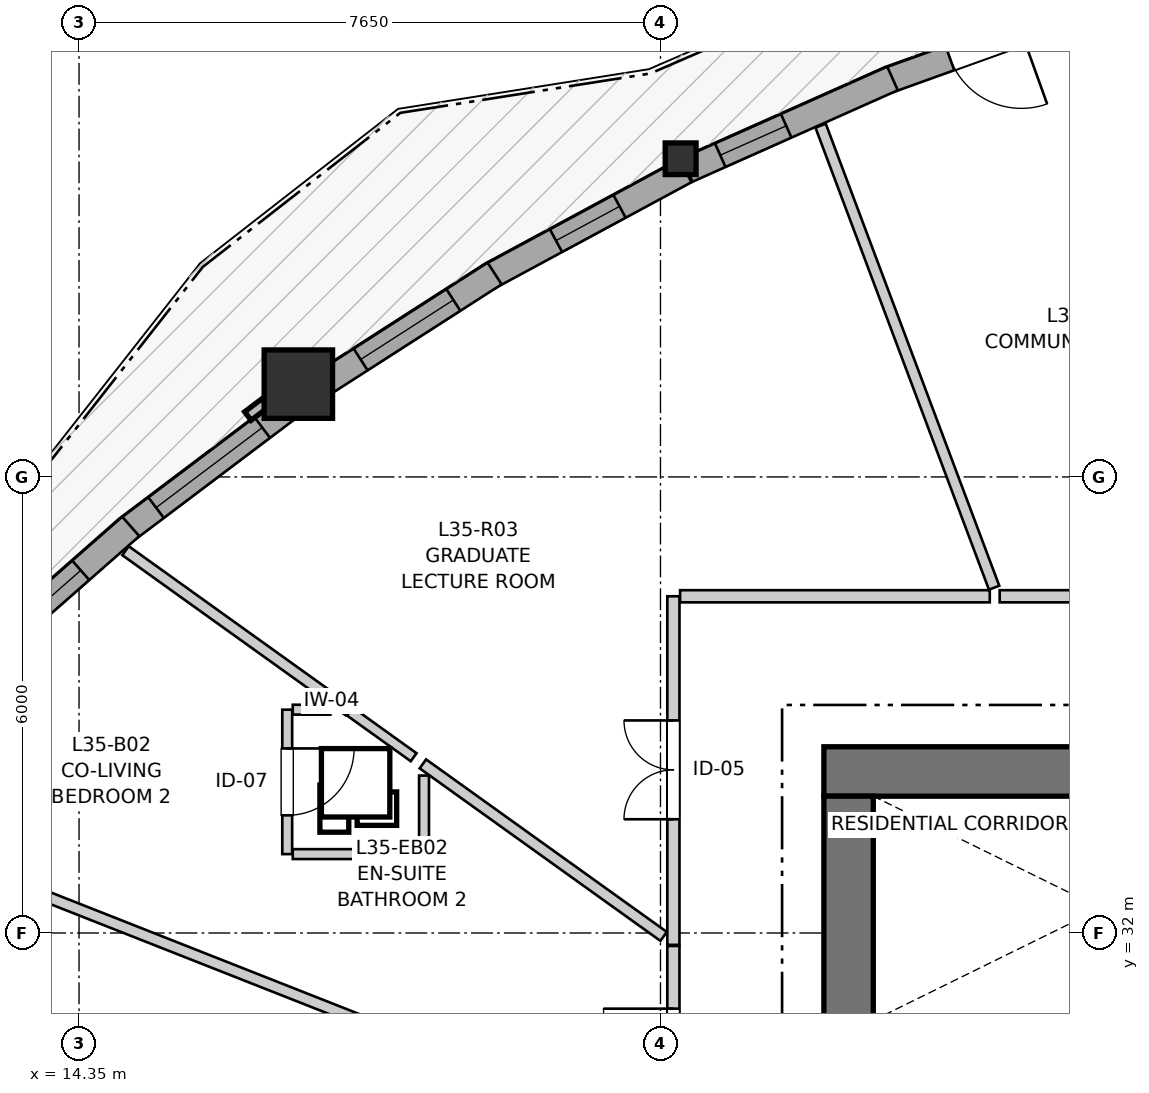
"""IFC4 building model, lengths in metres.
Left out: names, types, materials, properties, quantities, classifications, styles, units other than length and angle.
Written with IfcOpenShell. Run it as: python <this file> out.ifc"""

import sys

from ifc_helpers import new_model, si_unit, direction, frame, frame_2d, origin, origin_2d, place, context, subcontext, project, spatial, rectangle, i_section, extrude, source, transform, mapped, element, fill, save


model = new_model("IFC4")
c1 = context("Model", 3, precision=1e-05, world=origin(), true_north=direction((0.0, 1.0)))
c2 = subcontext(c1, "Body", "Model", "MODEL_VIEW")
j1 = project(units=[si_unit("LENGTHUNIT", "METRE"), si_unit("PLANEANGLEUNIT", "RADIAN")], contexts=[c1])
p1 = place(None, origin())
s1 = spatial("IfcSite", under=j1, at=p1, CompositionType="ELEMENT")
p2 = place(p1, origin())
s2 = spatial("IfcBuilding", under=s1, at=p2, CompositionType="ELEMENT")
p3 = place(p2, frame((0.0, 0.0, 118.4)))
s3 = spatial("IfcBuildingStorey", under=s2, at=p3, CompositionType="ELEMENT", Elevation=118.4)
p4 = place(p3, frame((36.55, 34.125, 0.0), z_axis=(0.0, 0.0, 1.0), x_axis=(-1.0, 0.0, 0.0)))
e1 = element("IfcWall", 1, at=p4, inside=s3, PredefinedType="SHEAR", context=c2, shape_type="SweptSolid", body=[
    extrude(rectangle(XDim=12.4, YDim=0.65, at=frame_2d((6.2, 0.0))), origin(), (0.0, 0.0, 1.0), 2.95),
])
p5 = place(p3, frame((24.475, 33.8, 0.0), z_axis=(0.0, 0.0, 1.0), x_axis=(0.0, -1.0, 0.0)))
e2 = element("IfcWall", 2, at=p5, inside=s3, PredefinedType="SHEAR", context=c2, shape_type="SweptSolid", body=[
    extrude(rectangle(XDim=15.6, YDim=0.65, at=frame_2d((7.8, 0.0))), origin(), (0.0, 0.0, 1.0), 2.95),
])
p6 = place(p5, frame((7.05, 0.0, 0.0)))
e3 = element("IfcOpeningElement", 3, at=p6, cuts=e2, PredefinedType="OPENING", context=c2, shape_type="SweptSolid", body=[
    extrude(rectangle(XDim=1.5, YDim=2.15, at=frame_2d((0.75, 1.075))), frame((0.0, 0.335, 0.0), z_axis=(0.0, -1.0, 0.0), x_axis=(1.0, 0.0, 0.0)), (0.0, 0.0, 1.0), 0.67),
])
p7 = place(p5, frame((3.52, 0.0, 0.0)))
e4 = element("IfcOpeningElement", 4, at=p7, cuts=e2, PredefinedType="OPENING", context=c2, shape_type="SweptSolid", body=[
    extrude(rectangle(XDim=0.86, YDim=2.05, at=frame_2d((0.43, 1.025))), frame((0.0, 0.335, 0.0), z_axis=(0.0, -1.0, 0.0), x_axis=(1.0, 0.0, 0.0)), (0.0, 0.0, 1.0), 0.67),
])
p8 = place(p5, frame((11.22, 0.0, 0.0)))
e5 = element("IfcOpeningElement", 5, at=p8, cuts=e2, PredefinedType="OPENING", context=c2, shape_type="SweptSolid", body=[
    extrude(rectangle(XDim=0.86, YDim=2.05, at=frame_2d((0.43, 1.025))), frame((0.0, 0.335, 0.0), z_axis=(0.0, -1.0, 0.0), x_axis=(1.0, 0.0, 0.0)), (0.0, 0.0, 1.0), 0.67),
])
m1 = source(origin(), c2, "Body", "SweptSolid", [
    extrude(i_section(OverallWidth=0.406, OverallDepth=0.416, WebThickness=0.027, FlangeThickness=0.044, FilletRadius=0.015, at=origin_2d()), origin(), (0.0, 0.0, 1.0), 2.95),
])
p9 = place(p3, frame((22.265, 42.186, 0.0), z_axis=(0.0, 0.0, 1.0), x_axis=(1.0, 0.0, 0.0)))
e6 = element("IfcColumn", 6, at=p9, inside=s3, PredefinedType="PILASTER", context=c2, shape_type="MappedRepresentation", body=[
    mapped(m1, transform((0.0, 0.0, 0.0), x_axis=(1.0, 0.0, 0.0), y_axis=(0.0, 1.0, 0.0), z_axis=(0.0, 0.0, 1.0), scale=1.0)),
])
m2 = source(origin(), c2, "Body", "SweptSolid", [
    extrude(rectangle(XDim=0.9, YDim=0.9, at=origin_2d()), origin(), (0.0, 0.0, 1.0), 2.95),
])
p10 = place(p3, frame((17.236, 39.221, 0.0), z_axis=(0.0, 0.0, 1.0), x_axis=(1.0, 0.0, 0.0)))
e7 = element("IfcColumn", 7, at=p10, inside=s3, PredefinedType="COLUMN", context=c2, shape_type="MappedRepresentation", body=[
    mapped(m2, transform((0.0, 0.0, 0.0), x_axis=(1.0, 0.0, 0.0), y_axis=(0.0, 1.0, 0.0), z_axis=(0.0, 0.0, 1.0), scale=1.0)),
])
p11 = place(p3, frame((27.586, 44.149, 0.0), z_axis=(0.0, 0.0, 1.0), x_axis=(-0.941112277287, -0.338094190338, 0.0)))
e8 = element("IfcWall", 8, at=p11, inside=s3, PredefinedType="SOLIDWALL", context=c2, shape_type="SweptSolid", body=[
    extrude(rectangle(XDim=2.779, YDim=0.34, at=frame_2d((1.39, 0.0))), origin(), (0.0, 0.0, 1.0), 2.48),
])
p12 = place(p11, frame((0.89, 0.0, 0.0)))
e9 = element("IfcOpeningElement", 9, at=p12, cuts=e8, PredefinedType="OPENING", context=c2, shape_type="SweptSolid", body=[
    extrude(rectangle(XDim=1.0, YDim=2.1, at=frame_2d((0.5, 1.05))), frame((0.0, 0.18, 0.0), z_axis=(0.0, -1.0, 0.0), x_axis=(1.0, 0.0, 0.0)), (0.0, 0.0, 1.0), 0.36),
])
p13 = place(p3, frame((25.053, 43.243, 0.0), z_axis=(0.0, 0.0, 1.0), x_axis=(-0.91339900063, -0.407065431655, 0.0)))
e10 = element("IfcWall", 10, at=p13, inside=s3, PredefinedType="SOLIDWALL", context=c2, shape_type="SweptSolid", body=[
    extrude(rectangle(XDim=2.956, YDim=0.34, at=frame_2d((1.478, 0.0))), origin(), (0.0, 0.0, 1.0), 2.48),
])
p14 = place(p13, frame((1.531, 0.0, 0.82)))
e11 = element("IfcOpeningElement", 11, at=p14, cuts=e10, PredefinedType="OPENING", context=c2, shape_type="SweptSolid", body=[
    extrude(rectangle(XDim=0.95, YDim=1.35, at=frame_2d((0.475, 0.675))), frame((0.0, 0.18, 0.0), z_axis=(0.0, -1.0, 0.0), x_axis=(1.0, 0.0, 0.0)), (0.0, 0.0, 1.0), 0.36),
])
p15 = place(p3, frame((22.328, 42.027, 0.0), z_axis=(0.0, 0.0, 1.0), x_axis=(-0.880092136679, -0.474802939077, 0.0)))
e12 = element("IfcWall", 12, at=p15, inside=s3, PredefinedType="SOLIDWALL", context=c2, shape_type="SweptSolid", body=[
    extrude(rectangle(XDim=2.94, YDim=0.34, at=frame_2d((1.47, 0.0))), origin(), (0.0, 0.0, 1.0), 2.48),
])
p16 = place(p15, frame((0.985, 0.0, 0.82)))
e13 = element("IfcOpeningElement", 13, at=p16, cuts=e12, PredefinedType="OPENING", context=c2, shape_type="SweptSolid", body=[
    extrude(rectangle(XDim=0.95, YDim=1.35, at=frame_2d((0.475, 0.675))), frame((0.0, 0.18, 0.0), z_axis=(0.0, -1.0, 0.0), x_axis=(1.0, 0.0, 0.0)), (0.0, 0.0, 1.0), 0.36),
])
p17 = place(p3, frame((19.818, 40.677, 0.0), z_axis=(0.0, 0.0, 1.0), x_axis=(-0.841503814414, -0.540251173369, 0.0)))
e14 = element("IfcWall", 14, at=p17, inside=s3, PredefinedType="SOLIDWALL", context=c2, shape_type="SweptSolid", body=[
    extrude(rectangle(XDim=2.729, YDim=0.34, at=frame_2d((1.365, 0.0))), origin(), (0.0, 0.0, 1.0), 2.48),
])
p18 = place(p17, frame((0.645, 0.0, 0.82)))
e15 = element("IfcOpeningElement", 15, at=p18, cuts=e14, PredefinedType="OPENING", context=c2, shape_type="SweptSolid", body=[
    extrude(rectangle(XDim=1.45, YDim=1.25, at=frame_2d((0.725, 0.625))), frame((0.0, 0.18, 0.0), z_axis=(0.0, -1.0, 0.0), x_axis=(1.0, 0.0, 0.0)), (0.0, 0.0, 1.0), 0.36),
])
p19 = place(p3, frame((17.154, 38.947, 0.0), z_axis=(0.0, 0.0, 1.0), x_axis=(-0.798332692302, -0.602216665663, 0.0)))
e16 = element("IfcWall", 16, at=p19, inside=s3, PredefinedType="SOLIDWALL", context=c2, shape_type="SweptSolid", body=[
    extrude(rectangle(XDim=2.746, YDim=0.34, at=frame_2d((1.373, 0.0))), origin(), (0.0, 0.0, 1.0), 2.48),
])
p20 = place(p19, frame((0.493, 0.0, 0.82)))
e17 = element("IfcOpeningElement", 17, at=p20, cuts=e16, PredefinedType="OPENING", context=c2, shape_type="SweptSolid", body=[
    extrude(rectangle(XDim=1.75, YDim=1.3, at=frame_2d((0.875, 0.65))), frame((0.0, 0.18, 0.0), z_axis=(0.0, -1.0, 0.0), x_axis=(1.0, 0.0, 0.0)), (0.0, 0.0, 1.0), 0.36),
])
p21 = place(p3, frame((15.031, 37.349, 0.0), z_axis=(0.0, 0.0, 1.0), x_axis=(-0.751472812955, -0.659764057364, 0.0)))
e18 = element("IfcWall", 18, at=p21, inside=s3, PredefinedType="SOLIDWALL", context=c2, shape_type="SweptSolid", body=[
    extrude(rectangle(XDim=2.99, YDim=0.34, at=frame_2d((1.495, 0.0))), origin(), (0.0, 0.0, 1.0), 2.48),
])
p22 = place(p21, frame((0.875, 0.0, 0.82)))
e19 = element("IfcOpeningElement", 19, at=p22, cuts=e18, PredefinedType="OPENING", context=c2, shape_type="SweptSolid", body=[
    extrude(rectangle(XDim=1.45, YDim=1.25, at=frame_2d((0.725, 0.625))), frame((0.0, 0.18, 0.0), z_axis=(0.0, -1.0, 0.0), x_axis=(1.0, 0.0, 0.0)), (0.0, 0.0, 1.0), 0.36),
])
p23 = place(p3, frame((22.17, 31.844, 0.0), z_axis=(0.0, 0.0, 1.0), x_axis=(0.0, 1.0, 0.0)))
e20 = element("IfcWall", 20, at=p23, inside=s3, PredefinedType="PARTITIONING", context=c2, shape_type="SweptSolid", body=[
    extrude(rectangle(XDim=4.586, YDim=0.16, at=frame_2d((2.293, 0.0))), origin(), (0.0, 0.0, 1.0), 2.95),
])
p24 = place(p23, frame((1.653, 0.0, 0.0)))
e21 = element("IfcOpeningElement", 21, at=p24, cuts=e20, PredefinedType="OPENING", context=c2, shape_type="SweptSolid", body=[
    extrude(rectangle(XDim=1.3, YDim=2.1, at=frame_2d((0.65, 1.05))), frame((0.0, 0.09, 0.0), z_axis=(0.0, -1.0, 0.0), x_axis=(1.0, 0.0, 0.0)), (0.0, 0.0, 1.0), 0.18),
])
p25 = place(p3, frame((26.463, 36.43, 0.0), z_axis=(0.0, 0.0, 1.0), x_axis=(1.0, 0.0, 0.0)))
e22 = element("IfcWall", 22, at=p25, inside=s3, PredefinedType="PARTITIONING", context=c2, shape_type="SweptSolid", body=[
    extrude(rectangle(XDim=3.585, YDim=0.16, at=frame_2d((1.792, 0.0))), origin(), (0.0, 0.0, 1.0), 2.95),
])
p26 = place(p25, frame((1.119, 0.0, 0.0)))
e23 = element("IfcOpeningElement", 23, at=p26, cuts=e22, PredefinedType="OPENING", context=c2, shape_type="SweptSolid", body=[
    extrude(rectangle(XDim=1.3, YDim=2.1, at=frame_2d((0.65, 1.05))), frame((0.0, 0.09, 0.0), z_axis=(0.0, -1.0, 0.0), x_axis=(1.0, 0.0, 0.0)), (0.0, 0.0, 1.0), 0.18),
])
p27 = place(p3, frame((22.17, 29.209, 0.0), z_axis=(0.0, 0.0, 1.0), x_axis=(0.0, 1.0, 0.0)))
e24 = element("IfcWall", 24, at=p27, inside=s3, PredefinedType="PARTITIONING", context=c2, shape_type="SweptSolid", body=[
    extrude(rectangle(XDim=2.62, YDim=0.16, at=frame_2d((1.31, 0.0))), origin(), (0.0, 0.0, 1.0), 2.95),
])
p28 = place(p27, frame((0.875, 0.0, 0.0)))
e25 = element("IfcOpeningElement", 25, at=p28, cuts=e24, PredefinedType="OPENING", context=c2, shape_type="SweptSolid", body=[
    extrude(rectangle(XDim=0.92, YDim=2.1, at=frame_2d((0.46, 1.05))), frame((0.0, 0.09, 0.0), z_axis=(0.0, -1.0, 0.0), x_axis=(1.0, 0.0, 0.0)), (0.0, 0.0, 1.0), 0.18),
])
p29 = place(p3, frame((17.089, 34.938, 0.0), z_axis=(0.0, 0.0, 1.0), x_axis=(0.0, -1.0, 0.0)))
e26 = element("IfcWall", 26, at=p29, inside=s3, PredefinedType="PARTITIONING", context=c2, shape_type="SweptSolid", body=[
    extrude(rectangle(XDim=1.9, YDim=0.13, at=frame_2d((0.95, 0.0))), origin(), (0.0, 0.0, 1.0), 2.95),
])
p30 = place(p29, frame((0.51, 0.0, 0.0)))
e27 = element("IfcOpeningElement", 27, at=p30, cuts=e26, PredefinedType="OPENING", context=c2, shape_type="SweptSolid", body=[
    extrude(rectangle(XDim=0.88, YDim=2.05, at=frame_2d((0.44, 1.025))), frame((0.0, 0.075, 0.0), z_axis=(0.0, -1.0, 0.0), x_axis=(1.0, 0.0, 0.0)), (0.0, 0.0, 1.0), 0.15),
])
p31 = place(p3, frame((11.228, 33.54, 0.0), z_axis=(0.0, 0.0, 1.0), x_axis=(0.930301058265, -0.366796866114, 0.0)))
e28 = element("IfcWall", 28, at=p31, inside=s3, PredefinedType="PARTITIONING", context=c2, shape_type="SweptSolid", body=[
    extrude(rectangle(XDim=11.639, YDim=0.145, at=frame_2d((5.82, 0.0))), origin(), (0.0, 0.0, 1.0), 2.95),
])
p32 = place(p3, frame((24.107, 42.621, 0.0), z_axis=(0.0, 0.0, 1.0), x_axis=(0.351605509999, -0.93614826034, 0.0)))
e29 = element("IfcWall", 29, at=p32, inside=s3, PredefinedType="PARTITIONING", context=c2, shape_type="SweptSolid", body=[
    extrude(rectangle(XDim=6.493, YDim=0.145, at=frame_2d((3.247, 0.0))), origin(), (0.0, 0.0, 1.0), 2.95),
])
p33 = place(p3, frame((22.258, 36.43, 0.0), z_axis=(0.0, 0.0, 1.0), x_axis=(1.0, 0.0, 0.0)))
e30 = element("IfcWall", 30, at=p33, inside=s3, PredefinedType="PARTITIONING", context=c2, shape_type="SweptSolid", body=[
    extrude(rectangle(XDim=4.074, YDim=0.16, at=frame_2d((2.037, 0.0))), origin(), (0.0, 0.0, 1.0), 2.588),
])
p34 = place(p3, frame((18.874, 34.225, 0.0), z_axis=(0.0, 0.0, 1.0), x_axis=(0.812826521731, -0.582505833079, 0.0)))
e31 = element("IfcWall", 31, at=p34, inside=s3, PredefinedType="PARTITIONING", context=c2, shape_type="SweptSolid", body=[
    extrude(rectangle(XDim=3.896, YDim=0.145, at=frame_2d((1.948, 0.0))), origin(), (0.0, 0.0, 1.0), 2.95),
])
p35 = place(p3, frame((14.961, 37.03, 0.0), z_axis=(0.0, 0.0, 1.0), x_axis=(0.812838437321, -0.582489205748, 0.0)))
e32 = element("IfcWall", 32, at=p35, inside=s3, PredefinedType="PARTITIONING", context=c2, shape_type="SweptSolid", body=[
    extrude(rectangle(XDim=3.616, YDim=0.145, at=frame_2d((1.808, 0.0))), origin(), (0.0, 0.0, 1.0), 2.95),
])
p36 = place(p3, frame((17.162, 33.038, 0.0), z_axis=(0.0, 0.0, 1.0), x_axis=(1.0, 0.0, 0.0)))
e33 = element("IfcWall", 33, at=p36, inside=s3, PredefinedType="PARTITIONING", context=c2, shape_type="SweptSolid", body=[
    extrude(rectangle(XDim=1.727, YDim=0.13, at=frame_2d((0.863, 0.0))), origin(), (0.0, 0.0, 1.0), 2.95),
])
p37 = place(p3, frame((18.889, 33.111, 0.0), z_axis=(0.0, 0.0, 1.0), x_axis=(0.0, 1.0, 0.0)))
e34 = element("IfcWall", 34, at=p37, inside=s3, PredefinedType="PARTITIONING", context=c2, shape_type="SweptSolid", body=[
    extrude(rectangle(XDim=0.96, YDim=0.13, at=frame_2d((0.48, 0.0))), origin(), (0.0, 0.0, 1.0), 2.95),
])
p38 = place(p3, frame((17.913, 34.914, 0.0), z_axis=(0.0, 0.0, 1.0), x_axis=(0.812774229327, -0.582578794792, 0.0)))
e35 = element("IfcWall", 35, at=p38, inside=s3, PredefinedType="PARTITIONING", context=c2, shape_type="SweptSolid", body=[
    extrude(rectangle(XDim=1.033, YDim=0.13, at=frame_2d((0.517, 0.0))), origin(), (0.0, 0.0, 1.0), 2.95),
])
p39 = place(p3, frame((17.162, 34.938, 0.0), z_axis=(0.0, 0.0, 1.0), x_axis=(1.0, 0.0, 0.0)))
e36 = element("IfcWall", 36, at=p39, inside=s3, PredefinedType="PARTITIONING", context=c2, shape_type="SweptSolid", body=[
    extrude(rectangle(XDim=0.495, YDim=0.13, at=frame_2d((0.247, 0.0))), origin(), (0.0, 0.0, 1.0), 2.95),
])
m3 = source(origin(), c2, "Body", "SweptSolid", [
    extrude(rectangle(XDim=0.95, YDim=1.35, at=frame_2d((0.475, 0.675))), frame((0.0, 0.03, 0.0), z_axis=(0.0, -1.0, 0.0), x_axis=(1.0, 0.0, 0.0)), (0.0, 0.0, 1.0), 0.06),
])
p40 = place(p14, origin())
e37 = element("IfcWindow", 37, at=p40, inside=s3, PartitioningType="SINGLE_PANEL", PredefinedType="WINDOW", context=c2, shape_type="MappedRepresentation", body=[
    mapped(m3, transform((0.0, 0.0, 0.0), x_axis=(1.0, 0.0, 0.0), y_axis=(0.0, 1.0, 0.0), z_axis=(0.0, 0.0, 1.0), scale=1.0)),
])
fill(e11, e37)
p41 = place(p16, origin())
e38 = element("IfcWindow", 38, at=p41, inside=s3, PartitioningType="SINGLE_PANEL", PredefinedType="WINDOW", context=c2, shape_type="MappedRepresentation", body=[
    mapped(m3, transform((0.0, 0.0, 0.0), x_axis=(1.0, 0.0, 0.0), y_axis=(0.0, 1.0, 0.0), z_axis=(0.0, 0.0, 1.0), scale=1.0)),
])
fill(e13, e38)
m4 = source(origin(), c2, "Body", "SweptSolid", [
    extrude(rectangle(XDim=1.45, YDim=1.25, at=frame_2d((0.725, 0.625))), frame((0.0, 0.03, 0.0), z_axis=(0.0, -1.0, 0.0), x_axis=(1.0, 0.0, 0.0)), (0.0, 0.0, 1.0), 0.06),
])
p42 = place(p18, origin())
e39 = element("IfcWindow", 39, at=p42, inside=s3, PartitioningType="SINGLE_PANEL", PredefinedType="WINDOW", context=c2, shape_type="MappedRepresentation", body=[
    mapped(m4, transform((0.0, 0.0, 0.0), x_axis=(1.0, 0.0, 0.0), y_axis=(0.0, 1.0, 0.0), z_axis=(0.0, 0.0, 1.0), scale=1.0)),
])
fill(e15, e39)
m5 = source(origin(), c2, "Body", "SweptSolid", [
    extrude(rectangle(XDim=1.75, YDim=1.3, at=frame_2d((0.875, 0.65))), frame((0.0, 0.03, 0.0), z_axis=(0.0, -1.0, 0.0), x_axis=(1.0, 0.0, 0.0)), (0.0, 0.0, 1.0), 0.06),
])
p43 = place(p20, origin())
e40 = element("IfcWindow", 40, at=p43, inside=s3, PartitioningType="SINGLE_PANEL", PredefinedType="WINDOW", context=c2, shape_type="MappedRepresentation", body=[
    mapped(m5, transform((0.0, 0.0, 0.0), x_axis=(1.0, 0.0, 0.0), y_axis=(0.0, 1.0, 0.0), z_axis=(0.0, 0.0, 1.0), scale=1.0)),
])
fill(e17, e40)
p44 = place(p22, origin())
e41 = element("IfcWindow", 41, at=p44, inside=s3, PartitioningType="SINGLE_PANEL", PredefinedType="WINDOW", context=c2, shape_type="MappedRepresentation", body=[
    mapped(m4, transform((0.0, 0.0, 0.0), x_axis=(1.0, 0.0, 0.0), y_axis=(0.0, 1.0, 0.0), z_axis=(0.0, 0.0, 1.0), scale=1.0)),
])
fill(e19, e41)
m6 = source(origin(), c2, "Body", "SweptSolid", [
    extrude(rectangle(XDim=1.0, YDim=2.1, at=frame_2d((0.5, 1.05))), frame((0.0, 0.025, 0.0), z_axis=(0.0, -1.0, 0.0), x_axis=(1.0, 0.0, 0.0)), (0.0, 0.0, 1.0), 0.05),
])
p45 = place(p12, origin())
e42 = element("IfcDoor", 42, at=p45, inside=s3, OperationType="SINGLE_SWING_LEFT", PredefinedType="DOOR", context=c2, shape_type="MappedRepresentation", body=[
    mapped(m6, transform((0.0, 0.0, 0.0), x_axis=(1.0, 0.0, 0.0), y_axis=(0.0, 1.0, 0.0), z_axis=(0.0, 0.0, 1.0), scale=1.0)),
])
fill(e9, e42)
m7 = source(origin(), c2, "Body", "SweptSolid", [
    extrude(rectangle(XDim=1.3, YDim=2.1, at=frame_2d((0.65, 1.05))), frame((0.0, 0.025, 0.0), z_axis=(0.0, -1.0, 0.0), x_axis=(1.0, 0.0, 0.0)), (0.0, 0.0, 1.0), 0.05),
])
p46 = place(p24, origin())
e43 = element("IfcDoor", 43, at=p46, inside=s3, OperationType="DOUBLE_DOOR_SINGLE_SWING", PredefinedType="DOOR", context=c2, shape_type="MappedRepresentation", body=[
    mapped(m7, transform((0.0, 0.0, 0.0), x_axis=(1.0, 0.0, 0.0), y_axis=(0.0, 1.0, 0.0), z_axis=(0.0, 0.0, 1.0), scale=1.0)),
])
fill(e21, e43)
m8 = source(origin(), c2, "Body", "SweptSolid", [
    extrude(rectangle(XDim=0.92, YDim=2.1, at=frame_2d((0.46, 1.05))), frame((0.0, 0.025, 0.0), z_axis=(0.0, -1.0, 0.0), x_axis=(1.0, 0.0, 0.0)), (0.0, 0.0, 1.0), 0.05),
])
p47 = place(p28, origin())
e44 = element("IfcDoor", 44, at=p47, inside=s3, OperationType="SINGLE_SWING_RIGHT", PredefinedType="DOOR", context=c2, shape_type="MappedRepresentation", body=[
    mapped(m8, transform((0.0, 0.0, 0.0), x_axis=(1.0, 0.0, 0.0), y_axis=(0.0, 1.0, 0.0), z_axis=(0.0, 0.0, 1.0), scale=1.0)),
])
fill(e25, e44)
m9 = source(origin(), c2, "Body", "SweptSolid", [
    extrude(rectangle(XDim=0.88, YDim=2.05, at=frame_2d((0.44, 1.025))), frame((0.0, 0.025, 0.0), z_axis=(0.0, -1.0, 0.0), x_axis=(1.0, 0.0, 0.0)), (0.0, 0.0, 1.0), 0.05),
])
p48 = place(p30, origin())
e45 = element("IfcDoor", 45, at=p48, inside=s3, OperationType="SINGLE_SWING_LEFT", PredefinedType="DOOR", context=c2, shape_type="MappedRepresentation", body=[
    mapped(m9, transform((0.0, 0.0, 0.0), x_axis=(1.0, 0.0, 0.0), y_axis=(0.0, 1.0, 0.0), z_axis=(0.0, 0.0, 1.0), scale=1.0)),
])
fill(e27, e45)
save(model, sys.argv[1])
